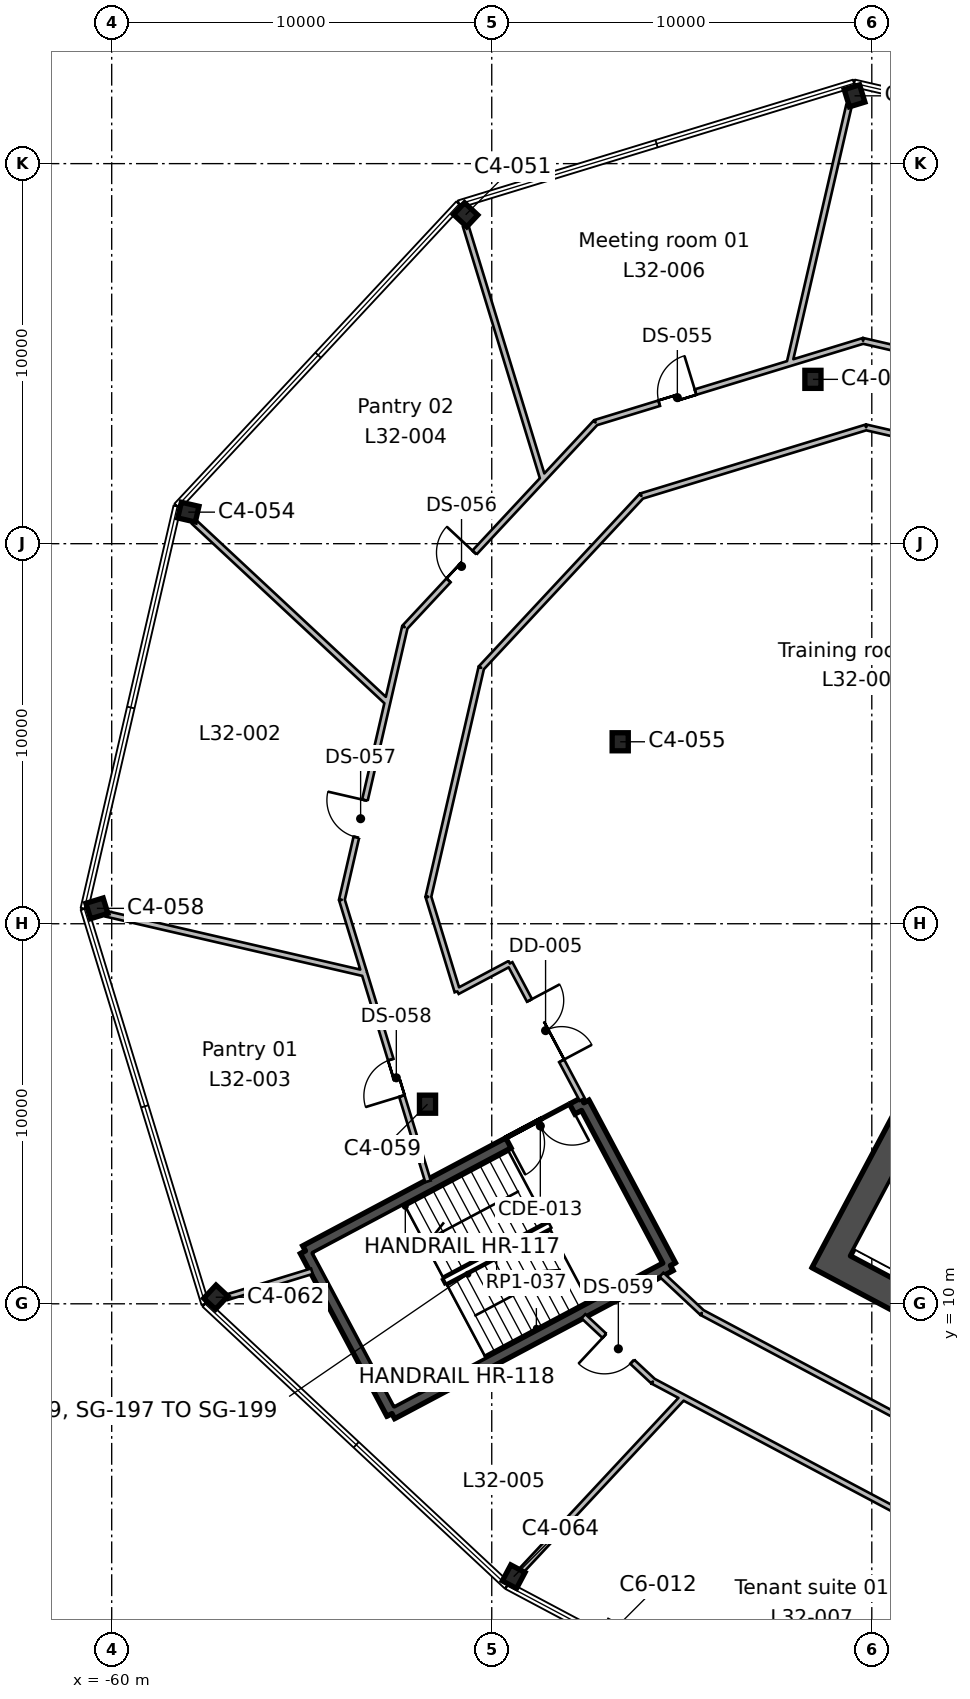
"""IFC4 building model, lengths in metres.
Left out: names, types, materials, properties, quantities, classifications, styles, units other than length and angle.
Written with IfcOpenShell. Run it as: python <this file> out.ifc"""

import sys

from ifc_helpers import new_model, si_unit, direction, frame, frame_2d, origin, origin_2d, place, context, subcontext, project, spatial, rectangle, i_section, extrude, element, fill, save


model = new_model("IFC4")
c1 = context("Model", 3, precision=1e-05, world=origin(), true_north=direction((0.0, 1.0)))
c2 = subcontext(c1, "Body", "Model", "MODEL_VIEW")
j1 = project(units=[si_unit("LENGTHUNIT", "METRE"), si_unit("PLANEANGLEUNIT", "RADIAN")], contexts=[c1])
p1 = place(None, origin())
s1 = spatial("IfcSite", under=j1, at=p1, CompositionType="ELEMENT")
p2 = place(p1, origin())
s2 = spatial("IfcBuilding", under=s1, at=p2, CompositionType="ELEMENT")
p3 = place(p2, frame((0.0, 0.0, 154.2)))
s3 = spatial("IfcBuildingStorey", under=s2, at=p3, CompositionType="ELEMENT", Elevation=154.2)
for number, where, z_axis, x_axis in (
    (1, (-49.423, 2.82, 0.0), (0.0, 0.0, 1.0), (0.883, -0.469, 0.0)),
    (2, (-57.262, 10.173, 0.0), (0.0, 0.0, 1.0), (0.731, -0.682, 0.0)),
    (3, (-51.69, 15.252, 0.0), (0.0, 0.0, 1.0), (1.0, 0.0, 0.0)),
    (4, (-60.39, 20.405, 0.0), (0.0, 0.0, 1.0), (0.292, -0.956, 0.0)),
    (5, (-46.62, 24.788, 0.0), (0.0, 0.0, 1.0), (1.0, 0.0, 0.0)),
    (6, (-57.983, 30.83, 0.0), (0.0, 0.0, 1.0), (-0.225, -0.974, 0.0)),
    (7, (-41.549, 34.324, 0.0), (0.0, 0.0, 1.0), (1.0, 0.0, 0.0)),
    (8, (-50.686, 38.655, 0.0), (0.0, 0.0, 1.0), (-0.682, -0.731, 0.0)),
    (9, (-40.454, 41.784, 0.0), (0.0, 0.0, 1.0), (-0.956, -0.292, 0.0)),
):
    element("IfcColumn", number, at=place(p3, frame(where, z_axis=z_axis, x_axis=x_axis)), inside=s3, PredefinedType="COLUMN", context=c2, shape_type="SweptSolid", body=[
        extrude(i_section(OverallWidth=0.424, OverallDepth=0.475, WebThickness=0.048, FlangeThickness=0.077, FilletRadius=0.015, at=origin_2d()), origin(), (0.0, 0.0, 1.0), 4.0),
    ])
p4 = place(p3, frame((-31.996, 28.168, 0.0), z_axis=(0.0, 0.0, 1.0), x_axis=(-0.469479580143, -0.882943329908, 0.0)))
e10 = element("IfcWall", 10, at=p4, inside=s3, PredefinedType="SHEAR", context=c2, shape_type="SweptSolid", body=[
    extrude(rectangle(XDim=19.7, YDim=0.75, at=frame_2d((9.85, 0.0))), origin(), (0.0, 0.0, 1.0), 4.0),
])
p5 = place(p4, frame((10.45, 0.0, 0.0)))
e11 = element("IfcOpeningElement", 11, at=p5, cuts=e10, PredefinedType="OPENING", context=c2, shape_type="SweptSolid", body=[
    extrude(rectangle(XDim=2.4, YDim=2.4, at=frame_2d((1.2, 1.2))), frame((0.0, 0.385, 0.0), z_axis=(0.0, -1.0, 0.0), x_axis=(1.0, 0.0, 0.0)), (0.0, 0.0, 1.0), 0.77),
])
p6 = place(p3, frame((-22.902, 1.446, 0.0), z_axis=(0.0, 0.0, 1.0), x_axis=(-0.88294509198, 0.469476266226, 0.0)))
e12 = element("IfcWall", 12, at=p6, inside=s3, PredefinedType="SHEAR", context=c2, shape_type="SweptSolid", body=[
    extrude(rectangle(XDim=20.2, YDim=0.75, at=frame_2d((10.1, 0.0))), origin(), (0.0, 0.0, 1.0), 4.0),
])
p7 = place(p3, frame((-47.574, 15.29, 0.0), z_axis=(0.0, 0.0, 1.0), x_axis=(0.469443498566, -0.882962514297, 0.0)))
e13 = element("IfcWall", 13, at=p7, inside=s3, PredefinedType="SHEAR", context=c2, shape_type="SweptSolid", body=[
    extrude(rectangle(XDim=4.85, YDim=0.3, at=frame_2d((2.425, 0.0))), origin(), (0.0, 0.0, 1.0), 4.0),
])
p8 = place(p3, frame((-45.297, 11.007, 0.0), z_axis=(0.0, 0.0, 1.0), x_axis=(-0.882951519127, -0.469464178475, 0.0)))
e14 = element("IfcWall", 14, at=p8, inside=s3, PredefinedType="SHEAR", context=c2, shape_type="SweptSolid", body=[
    extrude(rectangle(XDim=8.3, YDim=0.3, at=frame_2d((4.15, 0.0))), origin(), (0.0, 0.0, 1.0), 4.0),
])
p9 = place(p3, frame((-52.626, 7.111, 0.0), z_axis=(0.0, 0.0, 1.0), x_axis=(-0.469464364128, 0.882951420416, 0.0)))
e15 = element("IfcWall", 15, at=p9, inside=s3, PredefinedType="SHEAR", context=c2, shape_type="SweptSolid", body=[
    extrude(rectangle(XDim=4.85, YDim=0.3, at=frame_2d((2.425, 0.0))), origin(), (0.0, 0.0, 1.0), 4.0),
])
p10 = place(p3, frame((-54.903, 11.393, 0.0), z_axis=(0.0, 0.0, 1.0), x_axis=(0.882939326045, 0.469487110071, 0.0)))
e16 = element("IfcWall", 16, at=p10, inside=s3, PredefinedType="SHEAR", context=c2, shape_type="SweptSolid", body=[
    extrude(rectangle(XDim=8.3, YDim=0.3, at=frame_2d((4.15, 0.0))), origin(), (0.0, 0.0, 1.0), 4.0),
])
p11 = place(p10, frame((6.05, 0.0, 0.0)))
e17 = element("IfcOpeningElement", 17, at=p11, cuts=e16, PredefinedType="OPENING", context=c2, shape_type="SweptSolid", body=[
    extrude(rectangle(XDim=1.9, YDim=2.1, at=frame_2d((0.95, 1.05))), frame((0.0, 0.16, 0.0), z_axis=(0.0, -1.0, 0.0), x_axis=(1.0, 0.0, 0.0)), (0.0, 0.0, 1.0), 0.32),
])
p12 = place(p3, frame((-53.35, 18.692, 0.0), z_axis=(0.0, 0.0, 1.0), x_axis=(-0.974352209791, 0.225028378824, 0.0)))
e18 = element("IfcWall", 18, at=p12, inside=s3, PredefinedType="PARTITIONING", context=c2, shape_type="SweptSolid", body=[
    extrude(rectangle(XDim=6.969, YDim=0.15, at=frame_2d((3.484, 0.0))), origin(), (0.0, 0.0, 1.0), 3.64),
])
p13 = place(p3, frame((-57.841, 30.58, 0.0), z_axis=(0.0, 0.0, 1.0), x_axis=(0.731419737189, -0.68192753871, 0.0)))
e19 = element("IfcWall", 19, at=p13, inside=s3, PredefinedType="PARTITIONING", context=c2, shape_type="SweptSolid", body=[
    extrude(rectangle(XDim=6.97, YDim=0.15, at=frame_2d((3.485, 0.0))), origin(), (0.0, 0.0, 1.0), 3.64),
])
p14 = place(p3, frame((-54.732, 10.857, 0.0), z_axis=(0.0, 0.0, 1.0), x_axis=(-0.956196980242, -0.292723991119, 0.0)))
e20 = element("IfcWall", 20, at=p14, inside=s3, PredefinedType="PARTITIONING", context=c2, shape_type="SweptSolid", body=[
    extrude(rectangle(XDim=2.344, YDim=0.15, at=frame_2d((1.172, 0.0))), origin(), (0.0, 0.0, 1.0), 3.64),
])
p15 = place(p3, frame((-52.944, 24.956, 0.0), z_axis=(0.0, 0.0, 1.0), x_axis=(-0.225004075032, -0.974357822475, 0.0)))
e21 = element("IfcWall", 21, at=p15, inside=s3, PredefinedType="PARTITIONING", context=c2, shape_type="SweptSolid", body=[
    extrude(rectangle(XDim=4.44, YDim=0.15, at=frame_2d((2.22, 0.0))), origin(), (0.0, 0.0, 1.0), 3.64),
])
p16 = place(p15, frame((1.75, 0.0, 0.0)))
e22 = element("IfcOpeningElement", 22, at=p16, cuts=e21, PredefinedType="OPENING", context=c2, shape_type="SweptSolid", body=[
    extrude(rectangle(XDim=1.0, YDim=2.1, at=frame_2d((0.5, 1.05))), frame((0.0, 0.085, 0.0), z_axis=(0.0, -1.0, 0.0), x_axis=(1.0, 0.0, 0.0)), (0.0, 0.0, 1.0), 0.17),
])
p17 = place(p3, frame((-53.943, 20.63, 0.0), z_axis=(0.0, 0.0, 1.0), x_axis=(0.292550297048, -0.956250136574, 0.0)))
e23 = element("IfcWall", 23, at=p17, inside=s3, PredefinedType="PARTITIONING", context=c2, shape_type="SweptSolid", body=[
    extrude(rectangle(XDim=2.0, YDim=0.15, at=frame_2d((1.0, 0.0))), origin(), (0.0, 0.0, 1.0), 3.64),
])
p18 = place(p3, frame((-51.678, 13.222, 0.0), z_axis=(0.0, 0.0, 1.0), x_axis=(-0.292356699481, 0.956309343397, 0.0)))
e24 = element("IfcWall", 24, at=p18, inside=s3, PredefinedType="PARTITIONING", context=c2, shape_type="SweptSolid", body=[
    extrude(rectangle(XDim=5.746, YDim=0.15, at=frame_2d((2.873, 0.0))), origin(), (0.0, 0.0, 1.0), 3.64),
])
p19 = place(p18, frame((2.349, 0.0, 0.0)))
e25 = element("IfcOpeningElement", 25, at=p19, cuts=e24, PredefinedType="OPENING", context=c2, shape_type="SweptSolid", body=[
    extrude(rectangle(XDim=1.0, YDim=2.1, at=frame_2d((0.5, 1.05))), frame((0.0, 0.085, 0.0), z_axis=(0.0, -1.0, 0.0), x_axis=(1.0, 0.0, 0.0)), (0.0, 0.0, 1.0), 0.17),
])
p20 = place(p3, frame((-52.944, 24.956, 0.0), z_axis=(0.0, 0.0, 1.0), x_axis=(0.224898245089, 0.974382255255, 0.0)))
e26 = element("IfcWall", 26, at=p20, inside=s3, PredefinedType="PARTITIONING", context=c2, shape_type="SweptSolid", body=[
    extrude(rectangle(XDim=0.921, YDim=0.15, at=frame_2d((0.46, 0.0))), origin(), (0.0, 0.0, 1.0), 3.64),
])
p21 = place(p3, frame((-49.26, 31.048, 0.0), z_axis=(0.0, 0.0, 1.0), x_axis=(-0.682006580668, -0.731346035694, 0.0)))
e27 = element("IfcWall", 27, at=p21, inside=s3, PredefinedType="PARTITIONING", context=c2, shape_type="SweptSolid", body=[
    extrude(rectangle(XDim=4.438, YDim=0.15, at=frame_2d((2.219, 0.0))), origin(), (0.0, 0.0, 1.0), 3.64),
])
p22 = place(p21, frame((1.751, 0.0, 0.0)))
e28 = element("IfcOpeningElement", 28, at=p22, cuts=e27, PredefinedType="OPENING", context=c2, shape_type="SweptSolid", body=[
    extrude(rectangle(XDim=1.0, YDim=2.1, at=frame_2d((0.5, 1.05))), frame((0.0, 0.085, 0.0), z_axis=(0.0, -1.0, 0.0), x_axis=(1.0, 0.0, 0.0)), (0.0, 0.0, 1.0), 0.17),
])
p23 = place(p3, frame((-52.287, 27.802, 0.0), z_axis=(0.0, 0.0, 1.0), x_axis=(-0.224948647558, -0.974370620432, 0.0)))
e29 = element("IfcWall", 29, at=p23, inside=s3, PredefinedType="PARTITIONING", context=c2, shape_type="SweptSolid", body=[
    extrude(rectangle(XDim=2.0, YDim=0.15, at=frame_2d((1.0, 0.0))), origin(), (0.0, 0.0, 1.0), 3.64),
])
p24 = place(p3, frame((-50.688, 38.366, 0.0), z_axis=(0.0, 0.0, 1.0), x_axis=(0.292460621622, -0.956277566819, 0.0)))
e30 = element("IfcWall", 30, at=p24, inside=s3, PredefinedType="PARTITIONING", context=c2, shape_type="SweptSolid", body=[
    extrude(rectangle(XDim=6.969, YDim=0.15, at=frame_2d((3.484, 0.0))), origin(), (0.0, 0.0, 1.0), 3.64),
])
p25 = place(p3, frame((-44.967, 7.544, 0.0), z_axis=(0.0, 0.0, 1.0), x_axis=(-0.681977908196, -0.731372772759, 0.0)))
e31 = element("IfcWall", 31, at=p25, inside=s3, PredefinedType="PARTITIONING", context=c2, shape_type="SweptSolid", body=[
    extrude(rectangle(XDim=6.238, YDim=0.15, at=frame_2d((3.119, 0.0))), origin(), (0.0, 0.0, 1.0), 3.64),
])
p26 = place(p3, frame((-49.26, 31.048, 0.0), z_axis=(0.0, 0.0, 1.0), x_axis=(0.68175139462, 0.731583922687, 0.0)))
e32 = element("IfcWall", 32, at=p26, inside=s3, PredefinedType="PARTITIONING", context=c2, shape_type="SweptSolid", body=[
    extrude(rectangle(XDim=0.921, YDim=0.15, at=frame_2d((0.46, 0.0))), origin(), (0.0, 0.0, 1.0), 3.64),
])
p27 = place(p3, frame((-47.267, 33.185, 0.0), z_axis=(0.0, 0.0, 1.0), x_axis=(-0.682157389431, -0.731205372002, 0.0)))
e33 = element("IfcWall", 33, at=p27, inside=s3, PredefinedType="PARTITIONING", context=c2, shape_type="SweptSolid", body=[
    extrude(rectangle(XDim=2.001, YDim=0.15, at=frame_2d((1.0, 0.0))), origin(), (0.0, 0.0, 1.0), 3.64),
])
p28 = place(p3, frame((-47.268, 33.185, 0.0), z_axis=(0.0, 0.0, 1.0), x_axis=(0.956324248272, 0.292307940652, 0.0)))
e34 = element("IfcWall", 34, at=p28, inside=s3, PredefinedType="PARTITIONING", context=c2, shape_type="SweptSolid", body=[
    extrude(rectangle(XDim=4.44, YDim=0.15, at=frame_2d((2.22, 0.0))), origin(), (0.0, 0.0, 1.0), 3.64),
])
p29 = place(p28, frame((1.75, 0.0, 0.0)))
e35 = element("IfcOpeningElement", 35, at=p29, cuts=e34, PredefinedType="OPENING", context=c2, shape_type="SweptSolid", body=[
    extrude(rectangle(XDim=1.0, YDim=2.1, at=frame_2d((0.5, 1.05))), frame((0.0, 0.085, 0.0), z_axis=(0.0, -1.0, 0.0), x_axis=(1.0, 0.0, 0.0)), (0.0, 0.0, 1.0), 0.17),
])
p30 = place(p3, frame((-47.621, 15.378, 0.0), z_axis=(0.0, 0.0, 1.0), x_axis=(-0.469542997944, 0.882909606404, 0.0)))
e36 = element("IfcWall", 36, at=p30, inside=s3, PredefinedType="PARTITIONING", context=c2, shape_type="SweptSolid", body=[
    extrude(rectangle(XDim=4.051, YDim=0.15, at=frame_2d((2.025, 0.0))), origin(), (0.0, 0.0, 1.0), 3.64),
])
p31 = place(p30, frame((1.15, 0.0, 0.0)))
e37 = element("IfcOpeningElement", 37, at=p31, cuts=e36, PredefinedType="OPENING", context=c2, shape_type="SweptSolid", body=[
    extrude(rectangle(XDim=1.8, YDim=2.1, at=frame_2d((0.9, 1.05))), frame((0.0, 0.085, 0.0), z_axis=(0.0, -1.0, 0.0), x_axis=(1.0, 0.0, 0.0)), (0.0, 0.0, 1.0), 0.17),
])
p32 = place(p3, frame((-49.523, 18.954, 0.0), z_axis=(0.0, 0.0, 1.0), x_axis=(-0.882883395231, -0.469592281053, 0.0)))
e38 = element("IfcWall", 38, at=p32, inside=s3, PredefinedType="PARTITIONING", context=c2, shape_type="SweptSolid", body=[
    extrude(rectangle(XDim=1.565, YDim=0.15, at=frame_2d((0.783, 0.0))), origin(), (0.0, 0.0, 1.0), 3.64),
])
p33 = place(p3, frame((-50.905, 18.219, 0.0), z_axis=(0.0, 0.0, 1.0), x_axis=(-0.292616300327, 0.956229941376, 0.0)))
e39 = element("IfcWall", 39, at=p33, inside=s3, PredefinedType="PARTITIONING", context=c2, shape_type="SweptSolid", body=[
    extrude(rectangle(XDim=2.604, YDim=0.15, at=frame_2d((1.302, 0.0))), origin(), (0.0, 0.0, 1.0), 3.64),
])
p34 = place(p3, frame((-51.667, 20.709, 0.0), z_axis=(0.0, 0.0, 1.0), x_axis=(0.225044109818, 0.974348576556, 0.0)))
e40 = element("IfcWall", 40, at=p34, inside=s3, PredefinedType="PARTITIONING", context=c2, shape_type="SweptSolid", body=[
    extrude(rectangle(XDim=6.181, YDim=0.15, at=frame_2d((3.091, 0.0))), origin(), (0.0, 0.0, 1.0), 3.64),
])
p35 = place(p3, frame((-50.276, 26.732, 0.0), z_axis=(0.0, 0.0, 1.0), x_axis=(0.681907204976, 0.731438694494, 0.0)))
e41 = element("IfcWall", 41, at=p35, inside=s3, PredefinedType="PARTITIONING", context=c2, shape_type="SweptSolid", body=[
    extrude(rectangle(XDim=6.181, YDim=0.15, at=frame_2d((3.09, 0.0))), origin(), (0.0, 0.0, 1.0), 3.64),
])
p36 = place(p3, frame((-46.061, 31.253, 0.0), z_axis=(0.0, 0.0, 1.0), x_axis=(0.956322135821, 0.292314851724, 0.0)))
e42 = element("IfcWall", 42, at=p36, inside=s3, PredefinedType="PARTITIONING", context=c2, shape_type="SweptSolid", body=[
    extrude(rectangle(XDim=6.182, YDim=0.15, at=frame_2d((3.091, 0.0))), origin(), (0.0, 0.0, 1.0), 3.64),
])
p37 = place(p3, frame((-40.149, 33.06, 0.0), z_axis=(0.0, 0.0, 1.0), x_axis=(0.97439342778, -0.224849834111, 0.0)))
e43 = element("IfcWall", 43, at=p37, inside=s3, PredefinedType="PARTITIONING", context=c2, shape_type="SweptSolid", body=[
    extrude(rectangle(XDim=7.374, YDim=0.15, at=frame_2d((3.687, 0.0))), origin(), (0.0, 0.0, 1.0), 3.64),
])
p38 = place(p3, frame((-45.02, 7.572, 0.0), z_axis=(0.0, 0.0, 1.0), x_axis=(-0.88288015149, 0.46959837958, 0.0)))
e44 = element("IfcWall", 44, at=p38, inside=s3, PredefinedType="PARTITIONING", context=c2, shape_type="SweptSolid", body=[
    extrude(rectangle(XDim=0.832, YDim=0.15, at=frame_2d((0.416, 0.0))), origin(), (0.0, 0.0, 1.0), 3.64),
])
p39 = place(p3, frame((-45.755, 7.963, 0.0), z_axis=(0.0, 0.0, 1.0), x_axis=(-0.731175081237, 0.682189856695, 0.0)))
e45 = element("IfcWall", 45, at=p39, inside=s3, PredefinedType="PARTITIONING", context=c2, shape_type="SweptSolid", body=[
    extrude(rectangle(XDim=2.507, YDim=0.15, at=frame_2d((1.253, 0.0))), origin(), (0.0, 0.0, 1.0), 3.64),
])
p40 = place(p39, frame((0.75, 0.0, 0.0)))
e46 = element("IfcOpeningElement", 46, at=p40, cuts=e45, PredefinedType="OPENING", context=c2, shape_type="SweptSolid", body=[
    extrude(rectangle(XDim=1.0, YDim=2.1, at=frame_2d((0.5, 1.05))), frame((0.0, 0.085, 0.0), z_axis=(0.0, -1.0, 0.0), x_axis=(1.0, 0.0, 0.0)), (0.0, 0.0, 1.0), 0.17),
])
p41 = place(p3, frame((-13.6, -6.643, 0.0), z_axis=(0.0, 0.0, 1.0), x_axis=(-0.882949199944, 0.469468540287, 0.0)))
e47 = element("IfcWall", 47, at=p41, inside=s3, PredefinedType="PARTITIONING", context=c2, shape_type="SweptSolid", body=[
    extrude(rectangle(XDim=34.959, YDim=0.15, at=frame_2d((17.479, 0.0))), origin(), (0.0, 0.0, 1.0), 3.64),
])
p42 = place(p3, frame((-44.467, 9.769, 0.0), z_axis=(0.0, 0.0, 1.0), x_axis=(-0.731027453332, 0.682348050833, 0.0)))
e48 = element("IfcWall", 48, at=p42, inside=s3, PredefinedType="PARTITIONING", context=c2, shape_type="SweptSolid", body=[
    extrude(rectangle(XDim=1.459, YDim=0.15, at=frame_2d((0.73, 0.0))), origin(), (0.0, 0.0, 1.0), 3.64),
])
p43 = place(p3, frame((-13.477, -9.2, 0.0), z_axis=(0.0, 0.0, 1.0), x_axis=(-0.882944359403, 0.469477643981, 0.0)))
e49 = element("IfcWall", 49, at=p43, inside=s3, PredefinedType="PARTITIONING", context=c2, shape_type="SweptSolid", body=[
    extrude(rectangle(XDim=35.725, YDim=0.15, at=frame_2d((17.862, 0.0))), origin(), (0.0, 0.0, 1.0), 3.64),
])
p44 = place(p43, frame((17.35, 0.0, 0.0)))
e50 = element("IfcOpeningElement", 50, at=p44, cuts=e49, PredefinedType="OPENING", context=c2, shape_type="SweptSolid", body=[
    extrude(rectangle(XDim=1.0, YDim=2.1, at=frame_2d((0.5, 1.05))), frame((0.0, 0.085, 0.0), z_axis=(0.0, -1.0, 0.0), x_axis=(1.0, 0.0, 0.0)), (0.0, 0.0, 1.0), 0.17),
])
p45 = place(p43, frame((14.949, 0.0, 0.0)))
e51 = element("IfcOpeningElement", 51, at=p45, cuts=e49, PredefinedType="OPENING", context=c2, shape_type="SweptSolid", body=[
    extrude(rectangle(XDim=1.0, YDim=2.1, at=frame_2d((0.5, 1.05))), frame((0.0, 0.085, 0.0), z_axis=(0.0, -1.0, 0.0), x_axis=(1.0, 0.0, 0.0)), (0.0, 0.0, 1.0), 0.17),
])
p46 = place(p3, frame((-43.022, 34.483, 0.0), z_axis=(0.0, 0.0, 1.0), x_axis=(0.956293877443, 0.29240728439, 0.0)))
e52 = element("IfcWall", 52, at=p46, inside=s3, PredefinedType="PARTITIONING", context=c2, shape_type="SweptSolid", body=[
    extrude(rectangle(XDim=0.92, YDim=0.15, at=frame_2d((0.46, 0.0))), origin(), (0.0, 0.0, 1.0), 3.64),
])
p47 = place(p3, frame((-40.599, 41.534, 0.0), z_axis=(0.0, 0.0, 1.0), x_axis=(-0.224987437389, -0.974361664382, 0.0)))
e53 = element("IfcWall", 53, at=p47, inside=s3, PredefinedType="PARTITIONING", context=c2, shape_type="SweptSolid", body=[
    extrude(rectangle(XDim=6.969, YDim=0.15, at=frame_2d((3.484, 0.0))), origin(), (0.0, 0.0, 1.0), 3.64),
])
p48 = place(p3, frame((-34.365, 33.983, 0.0), z_axis=(0.0, 0.0, 1.0), x_axis=(-0.974398716152, 0.224826915563, 0.0)))
e54 = element("IfcWall", 54, at=p48, inside=s3, PredefinedType="PARTITIONING", context=c2, shape_type="SweptSolid", body=[
    extrude(rectangle(XDim=6.018, YDim=0.15, at=frame_2d((3.009, 0.0))), origin(), (0.0, 0.0, 1.0), 3.64),
])
p49 = place(p48, frame((2.55, 0.0, 0.0)))
e55 = element("IfcOpeningElement", 55, at=p49, cuts=e54, PredefinedType="OPENING", context=c2, shape_type="SweptSolid", body=[
    extrude(rectangle(XDim=1.0, YDim=2.1, at=frame_2d((0.5, 1.05))), frame((0.0, 0.085, 0.0), z_axis=(0.0, -1.0, 0.0), x_axis=(1.0, 0.0, 0.0)), (0.0, 0.0, 1.0), 0.17),
])
p50 = place(p3, frame((-40.229, 35.336, 0.0), z_axis=(0.0, 0.0, 1.0), x_axis=(-0.956431126108, -0.291958046663, 0.0)))
e56 = element("IfcWall", 56, at=p50, inside=s3, PredefinedType="PARTITIONING", context=c2, shape_type="SweptSolid", body=[
    extrude(rectangle(XDim=2.0, YDim=0.15, at=frame_2d((1.0, 0.0))), origin(), (0.0, 0.0, 1.0), 3.64),
])
p51 = place(p11, frame((1.9, 0.0, 0.0), z_axis=(0.0, 0.0, 1.0), x_axis=(-1.0, 0.0, 0.0)))
e57 = element("IfcDoor", 57, at=p51, inside=s3, OperationType="DOUBLE_DOOR_SINGLE_SWING", PredefinedType="DOOR", context=c2, shape_type="SweptSolid", body=[
    extrude(rectangle(XDim=1.9, YDim=2.1, at=frame_2d((0.95, 1.05))), frame((0.0, 0.025, 0.0), z_axis=(0.0, -1.0, 0.0), x_axis=(1.0, 0.0, 0.0)), (0.0, 0.0, 1.0), 0.05),
])
fill(e17, e57)
p52 = place(p31, frame((1.8, 0.0, 0.0), z_axis=(0.0, 0.0, 1.0), x_axis=(-1.0, 0.0, 0.0)))
e58 = element("IfcDoor", 58, at=p52, inside=s3, OperationType="DOUBLE_DOOR_SINGLE_SWING", PredefinedType="DOOR", context=c2, shape_type="SweptSolid", body=[
    extrude(rectangle(XDim=1.8, YDim=2.1, at=frame_2d((0.9, 1.05))), frame((0.0, 0.025, 0.0), z_axis=(0.0, -1.0, 0.0), x_axis=(1.0, 0.0, 0.0)), (0.0, 0.0, 1.0), 0.05),
])
fill(e37, e58)
p53 = place(p29, origin())
e59 = element("IfcDoor", 59, at=p53, inside=s3, OperationType="SINGLE_SWING_RIGHT", PredefinedType="DOOR", context=c2, shape_type="SweptSolid", body=[
    extrude(rectangle(XDim=1.0, YDim=2.1, at=frame_2d((0.5, 1.05))), frame((0.0, 0.025, 0.0), z_axis=(0.0, -1.0, 0.0), x_axis=(1.0, 0.0, 0.0)), (0.0, 0.0, 1.0), 0.05),
])
fill(e35, e59)
p54 = place(p22, frame((1.0, 0.0, 0.0), z_axis=(0.0, 0.0, 1.0), x_axis=(-1.0, 0.0, 0.0)))
e60 = element("IfcDoor", 60, at=p54, inside=s3, OperationType="SINGLE_SWING_RIGHT", PredefinedType="DOOR", context=c2, shape_type="SweptSolid", body=[
    extrude(rectangle(XDim=1.0, YDim=2.1, at=frame_2d((0.5, 1.05))), frame((0.0, 0.025, 0.0), z_axis=(0.0, -1.0, 0.0), x_axis=(1.0, 0.0, 0.0)), (0.0, 0.0, 1.0), 0.05),
])
fill(e28, e60)
p55 = place(p16, frame((1.0, 0.0, 0.0), z_axis=(0.0, 0.0, 1.0), x_axis=(-1.0, 0.0, 0.0)))
e61 = element("IfcDoor", 61, at=p55, inside=s3, OperationType="SINGLE_SWING_RIGHT", PredefinedType="DOOR", context=c2, shape_type="SweptSolid", body=[
    extrude(rectangle(XDim=1.0, YDim=2.1, at=frame_2d((0.5, 1.05))), frame((0.0, 0.025, 0.0), z_axis=(0.0, -1.0, 0.0), x_axis=(1.0, 0.0, 0.0)), (0.0, 0.0, 1.0), 0.05),
])
fill(e22, e61)
p56 = place(p19, origin())
e62 = element("IfcDoor", 62, at=p56, inside=s3, OperationType="SINGLE_SWING_LEFT", PredefinedType="DOOR", context=c2, shape_type="SweptSolid", body=[
    extrude(rectangle(XDim=1.0, YDim=2.1, at=frame_2d((0.5, 1.05))), frame((0.0, 0.025, 0.0), z_axis=(0.0, -1.0, 0.0), x_axis=(1.0, 0.0, 0.0)), (0.0, 0.0, 1.0), 0.05),
])
fill(e25, e62)
p57 = place(p40, origin())
e63 = element("IfcDoor", 63, at=p57, inside=s3, OperationType="SINGLE_SWING_RIGHT", PredefinedType="DOOR", context=c2, shape_type="SweptSolid", body=[
    extrude(rectangle(XDim=1.0, YDim=2.1, at=frame_2d((0.5, 1.05))), frame((0.0, 0.025, 0.0), z_axis=(0.0, -1.0, 0.0), x_axis=(1.0, 0.0, 0.0)), (0.0, 0.0, 1.0), 0.05),
])
fill(e46, e63)
save(model, sys.argv[1])
